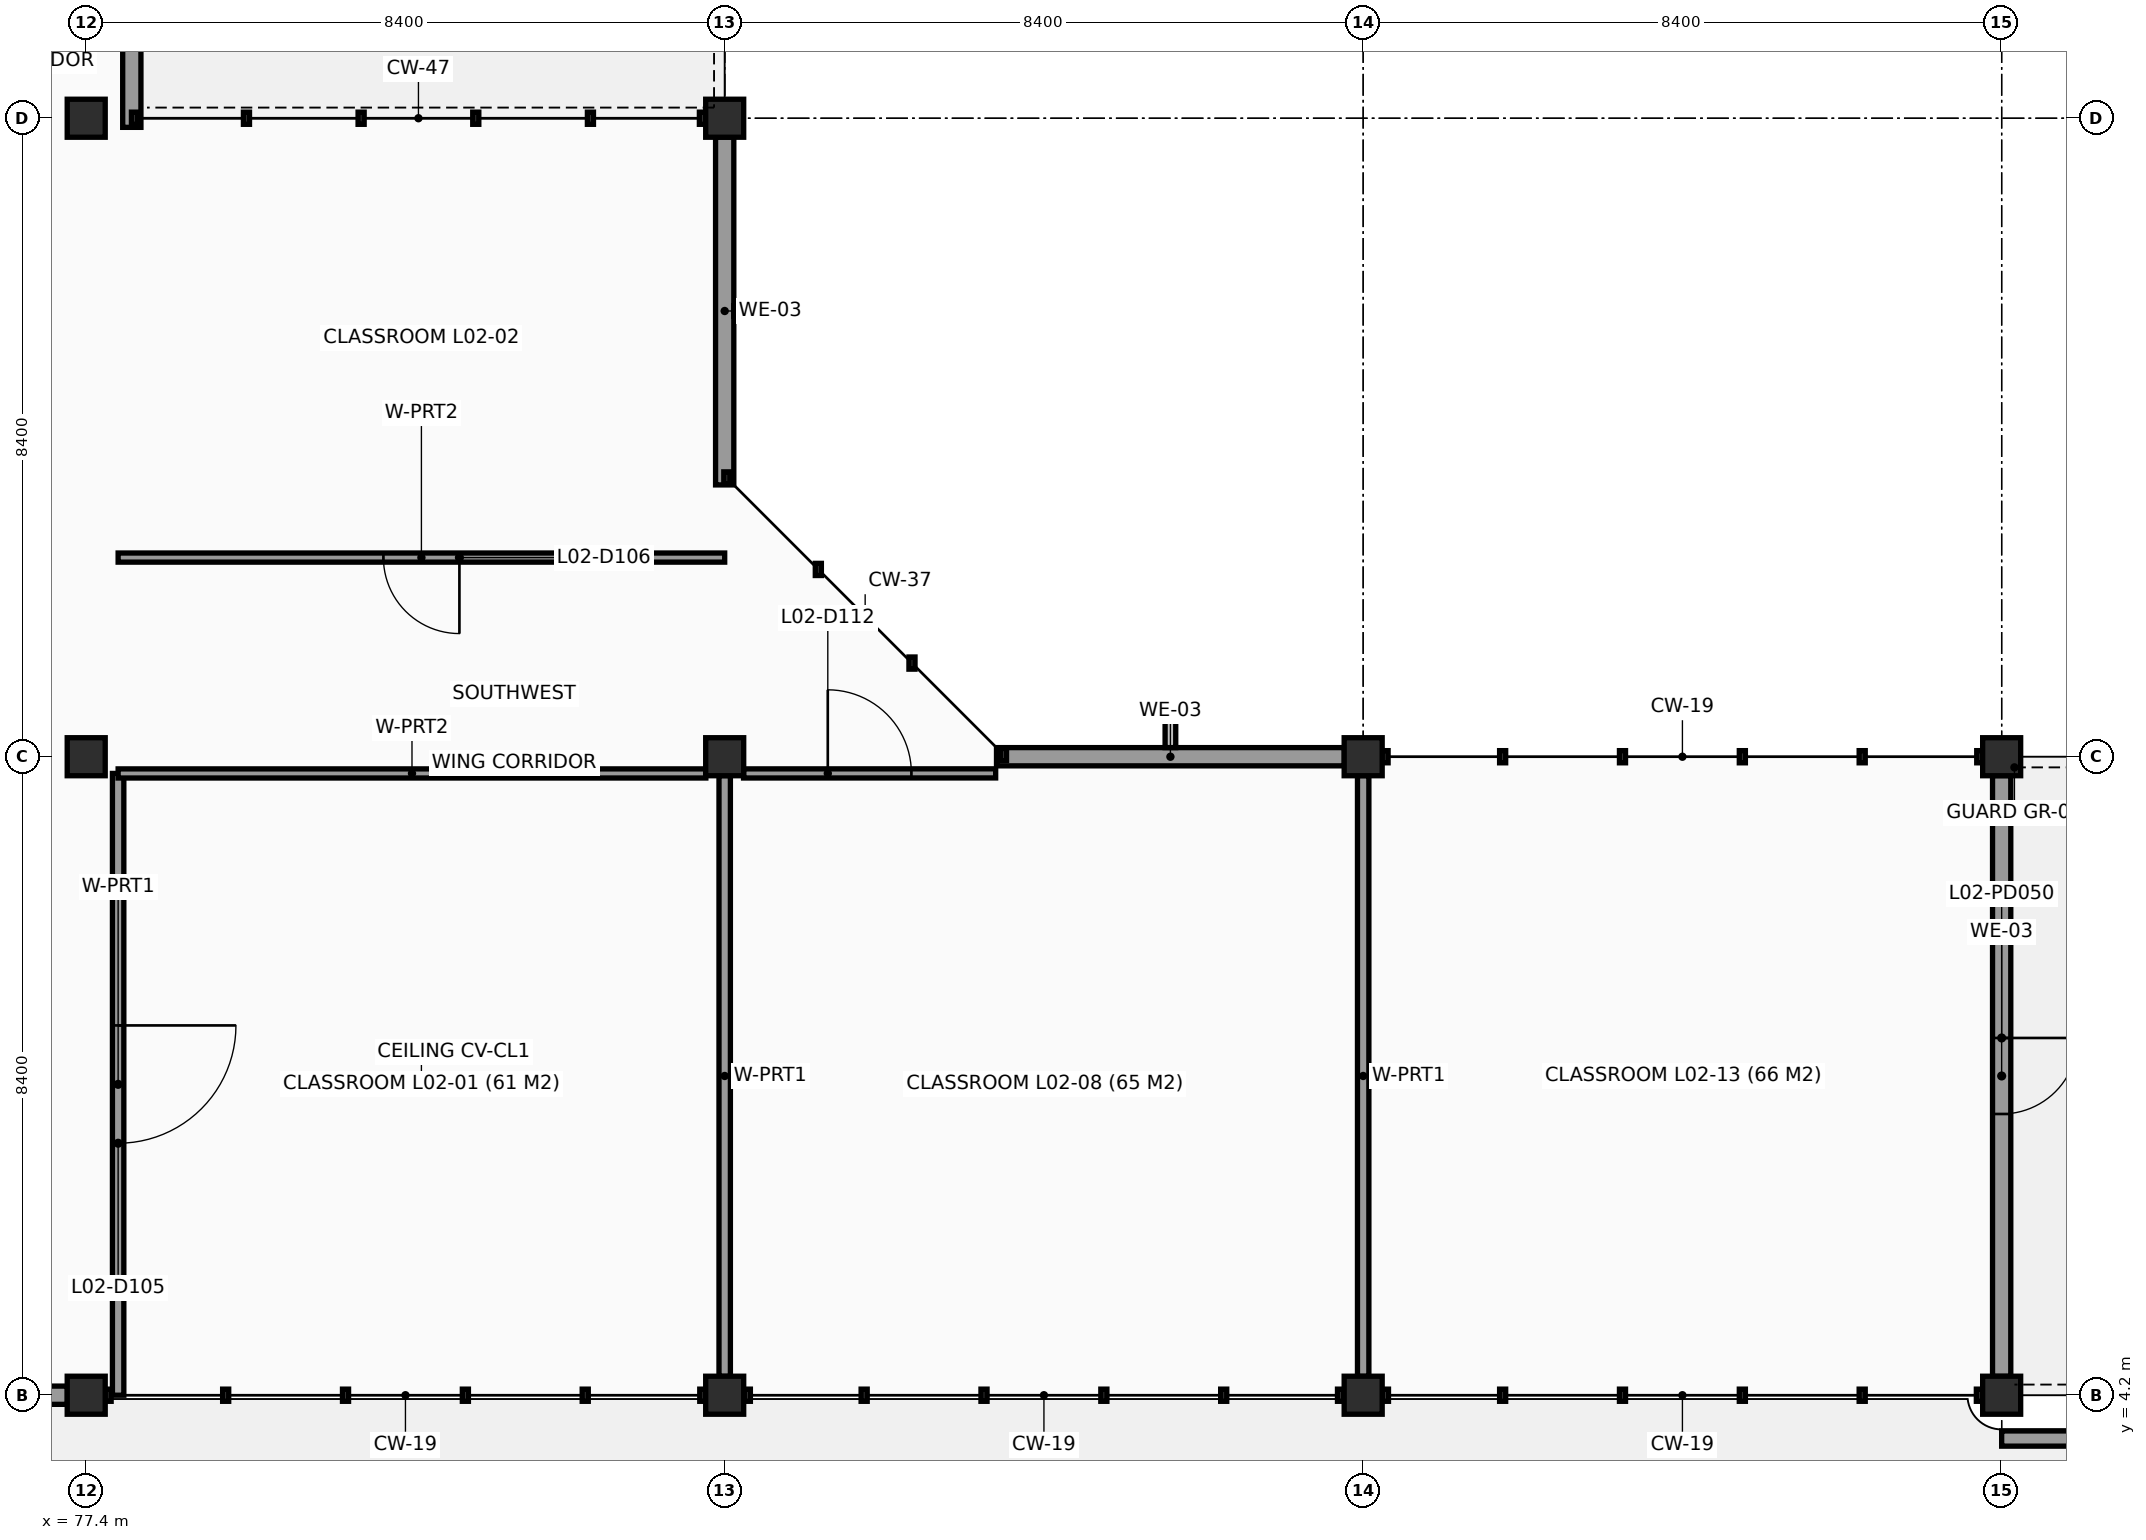
"""IFC4 building model, lengths in metres.
Left out: names, types, materials, properties, quantities, classifications, styles, units other than length and angle.
Written with IfcOpenShell. Run it as: python <this file> out.ifc"""

import sys

from ifc_helpers import new_model, si_unit, direction, frame, frame_2d, origin, origin_2d, place, context, subcontext, project, spatial, rectangle, extrude, element, fill, save


model = new_model("IFC4")
c1 = context("Model", 3, precision=1e-05, world=origin(), true_north=direction((0.0, 1.0)))
c2 = subcontext(c1, "Body", "Model", "MODEL_VIEW")
j1 = project(units=[si_unit("LENGTHUNIT", "METRE"), si_unit("PLANEANGLEUNIT", "RADIAN")], contexts=[c1])
p1 = place(None, origin())
s1 = spatial("IfcSite", under=j1, at=p1, CompositionType="ELEMENT")
p2 = place(p1, origin())
s2 = spatial("IfcBuilding", under=s1, at=p2, CompositionType="ELEMENT")
p3 = place(p2, frame((0.0, 0.0, 7.8)))
s3 = spatial("IfcBuildingStorey", under=s2, at=p3, CompositionType="ELEMENT", Elevation=7.8)
for number, where, z_axis, x_axis in (
    (1, (77.4, 4.2, 0.0), (0.0, 0.0, 1.0), (1.0, 0.0, 0.0)),
    (2, (77.4, 12.6, 0.0), (0.0, 0.0, 1.0), (1.0, 0.0, 0.0)),
    (3, (77.4, 21.0, 0.0), (0.0, 0.0, 1.0), (1.0, 0.0, 0.0)),
    (4, (85.8, 4.2, 0.0), (0.0, 0.0, 1.0), (1.0, 0.0, 0.0)),
    (5, (85.8, 12.6, 0.0), (0.0, 0.0, 1.0), (1.0, 0.0, 0.0)),
    (6, (85.8, 21.0, 0.0), (0.0, 0.0, 1.0), (1.0, 0.0, 0.0)),
    (7, (94.2, 4.2, 0.0), (0.0, 0.0, 1.0), (1.0, 0.0, 0.0)),
    (8, (94.2, 12.6, 0.0), (0.0, 0.0, 1.0), (1.0, 0.0, 0.0)),
    (9, (102.6, 4.2, 0.0), (0.0, 0.0, 1.0), (1.0, 0.0, 0.0)),
    (10, (102.6, 12.6, 0.0), (0.0, 0.0, 1.0), (1.0, 0.0, 0.0)),
):
    element("IfcColumn", number, at=place(p3, frame(where, z_axis=z_axis, x_axis=x_axis)), inside=s3, PredefinedType="COLUMN", context=c2, shape_type="SweptSolid", body=[
        extrude(rectangle(XDim=0.5, YDim=0.5, at=origin_2d()), origin(), (0.0, 0.0, 1.0), 3.34),
    ])
p4 = place(p3, frame((78.0, 29.52, 0.0), z_axis=(0.0, 0.0, 1.0), x_axis=(0.0, -1.0, 0.0)))
e11 = element("IfcWall", 11, at=p4, inside=s3, PredefinedType="SOLIDWALL", context=c2, shape_type="SweptSolid", body=[
    extrude(rectangle(XDim=8.64, YDim=0.24, at=frame_2d((4.32, 0.0))), origin(), (0.0, 0.0, 1.0), 2.58),
])
for number, where, z_axis, x_axis in (
    (12, (85.8, 20.752, 0.0), (0.0, 0.0, 1.0), (0.0, -1.0, 0.0)),
    (13, (89.376, 12.6, 0.0), (0.0, 0.0, 1.0), (1.0, 0.0, 0.0)),
):
    element("IfcWall", number, at=place(p3, frame(where, z_axis=z_axis, x_axis=x_axis)), inside=s3, PredefinedType="SOLIDWALL", context=c2, shape_type="SweptSolid", body=[
        extrude(rectangle(XDim=4.576, YDim=0.24, at=frame_2d((2.288, 0.0))), origin(), (0.0, 0.0, 1.0), 2.58),
    ])
p5 = place(p3, frame((102.6, 12.352, 0.0), z_axis=(0.0, 0.0, 1.0), x_axis=(0.0, -1.0, 0.0)))
e14 = element("IfcWall", 14, at=p5, inside=s3, PredefinedType="SOLIDWALL", context=c2, shape_type="SweptSolid", body=[
    extrude(rectangle(XDim=7.904, YDim=0.24, at=frame_2d((3.952, 0.0))), origin(), (0.0, 0.0, 1.0), 2.58),
])
p6 = place(p5, frame((3.452, 0.0, 0.0)))
e15 = element("IfcOpeningElement", 15, at=p6, cuts=e14, PredefinedType="OPENING", context=c2, shape_type="SweptSolid", body=[
    extrude(rectangle(XDim=1.0, YDim=2.15, at=frame_2d((0.5, 1.075))), frame((0.0, 0.13, 0.0), z_axis=(0.0, -1.0, 0.0), x_axis=(1.0, 0.0, 0.0)), (0.0, 0.0, 1.0), 0.26),
])
p7 = place(p3, frame((77.152, 4.2, 0.0), z_axis=(0.0, 0.0, 1.0), x_axis=(-1.0, 0.0, 0.0)))
e16 = element("IfcWall", 16, at=p7, inside=s3, PredefinedType="SOLIDWALL", context=c2, shape_type="SweptSolid", body=[
    extrude(rectangle(XDim=2.504, YDim=0.24, at=frame_2d((1.252, 0.0))), origin(), (0.0, 0.0, 1.0), 2.58),
])
p8 = place(p3, frame((102.6, 3.63, 0.0), z_axis=(0.0, 0.0, 1.0), x_axis=(1.0, 0.0, 0.0)))
e17 = element("IfcWall", 17, at=p8, inside=s3, PredefinedType="PARAPET", context=c2, shape_type="SweptSolid", body=[
    extrude(rectangle(XDim=16.68, YDim=0.2, at=frame_2d((8.34, 0.0))), origin(), (0.0, 0.0, 1.0), 1.1),
])
p9 = place(p3, frame((77.82, 4.2, 0.0), z_axis=(0.0, 0.0, 1.0), x_axis=(0.0, 1.0, 0.0)))
e18 = element("IfcWall", 18, at=p9, inside=s3, PredefinedType="PARTITIONING", context=c2, shape_type="SweptSolid", body=[
    extrude(rectangle(XDim=8.18, YDim=0.15, at=frame_2d((4.09, 0.0))), origin(), (0.0, 0.0, 1.0), 2.58),
])
p10 = place(p9, frame((3.315, 0.0, 0.0)))
e19 = element("IfcOpeningElement", 19, at=p10, cuts=e18, PredefinedType="OPENING", context=c2, shape_type="SweptSolid", body=[
    extrude(rectangle(XDim=1.55, YDim=2.2, at=frame_2d((0.775, 1.1))), frame((0.0, 0.085, 0.0), z_axis=(0.0, -1.0, 0.0), x_axis=(1.0, 0.0, 0.0)), (0.0, 0.0, 1.0), 0.17),
])
p11 = place(p3, frame((77.82, 12.38, 0.0), z_axis=(0.0, 0.0, 1.0), x_axis=(1.0, 0.0, 0.0)))
e20 = element("IfcWall", 20, at=p11, inside=s3, PredefinedType="PARTITIONING", context=c2, shape_type="SweptSolid", body=[
    extrude(rectangle(XDim=7.732, YDim=0.12, at=frame_2d((3.866, 0.0))), origin(), (0.0, 0.0, 1.0), 2.53),
])
p12 = place(p3, frame((85.8, 12.352, 0.0), z_axis=(0.0, 0.0, 1.0), x_axis=(0.0, -1.0, 0.0)))
e21 = element("IfcWall", 21, at=p12, inside=s3, PredefinedType="PARTITIONING", context=c2, shape_type="SweptSolid", body=[
    extrude(rectangle(XDim=7.904, YDim=0.15, at=frame_2d((3.952, 0.0))), origin(), (0.0, 0.0, 1.0), 2.92),
])
p13 = place(p3, frame((85.8, 15.22, 0.0), z_axis=(0.0, 0.0, 1.0), x_axis=(-1.0, 0.0, 0.0)))
e22 = element("IfcWall", 22, at=p13, inside=s3, PredefinedType="PARTITIONING", context=c2, shape_type="SweptSolid", body=[
    extrude(rectangle(XDim=7.98, YDim=0.12, at=frame_2d((3.99, 0.0))), origin(), (0.0, 0.0, 1.0), 2.58),
])
p14 = place(p13, frame((3.49, 0.0, 0.0)))
e23 = element("IfcOpeningElement", 23, at=p14, cuts=e22, PredefinedType="OPENING", context=c2, shape_type="SweptSolid", body=[
    extrude(rectangle(XDim=1.0, YDim=2.1, at=frame_2d((0.5, 1.05))), frame((0.0, 0.07, 0.0), z_axis=(0.0, -1.0, 0.0), x_axis=(1.0, 0.0, 0.0)), (0.0, 0.0, 1.0), 0.14),
])
p15 = place(p3, frame((86.048, 12.38, 0.0), z_axis=(0.0, 0.0, 1.0), x_axis=(0.99999997562, 0.00022081554, 0.0)))
e24 = element("IfcWall", 24, at=p15, inside=s3, PredefinedType="PARTITIONING", context=c2, shape_type="SweptSolid", body=[
    extrude(rectangle(XDim=3.317, YDim=0.12, at=frame_2d((1.658, 0.0))), origin(), (0.0, 0.0, 1.0), 2.58),
])
p16 = place(p15, frame((1.108, 0.0, 0.0)))
e25 = element("IfcOpeningElement", 25, at=p16, cuts=e24, PredefinedType="OPENING", context=c2, shape_type="SweptSolid", body=[
    extrude(rectangle(XDim=1.1, YDim=2.1, at=frame_2d((0.55, 1.05))), frame((0.0, 0.07, 0.0), z_axis=(0.0, -1.0, 0.0), x_axis=(1.0, 0.0, 0.0)), (0.0, 0.0, 1.0), 0.14),
])
p17 = place(p3, frame((94.2, 12.352, 0.0), z_axis=(0.0, 0.0, 1.0), x_axis=(0.0, -1.0, 0.0)))
e26 = element("IfcWall", 26, at=p17, inside=s3, PredefinedType="PARTITIONING", context=c2, shape_type="SweptSolid", body=[
    extrude(rectangle(XDim=7.904, YDim=0.15, at=frame_2d((3.952, 0.0))), origin(), (0.0, 0.0, 1.0), 2.63),
])
p18 = place(p6, origin())
e27 = element("IfcDoor", 27, at=p18, inside=s3, OperationType="SINGLE_SWING_LEFT", PredefinedType="DOOR", context=c2, shape_type="SweptSolid", body=[
    extrude(rectangle(XDim=1.0, YDim=2.15, at=frame_2d((0.5, 1.075))), frame((0.0, 0.025, 0.0), z_axis=(0.0, -1.0, 0.0), x_axis=(1.0, 0.0, 0.0)), (0.0, 0.0, 1.0), 0.05),
])
fill(e15, e27)
p19 = place(p10, origin())
e28 = element("IfcDoor", 28, at=p19, inside=s3, OperationType="DOUBLE_DOOR_SINGLE_SWING", PredefinedType="DOOR", context=c2, shape_type="SweptSolid", body=[
    extrude(rectangle(XDim=1.55, YDim=2.2, at=frame_2d((0.775, 1.1))), frame((0.0, 0.025, 0.0), z_axis=(0.0, -1.0, 0.0), x_axis=(1.0, 0.0, 0.0)), (0.0, 0.0, 1.0), 0.05),
])
fill(e19, e28)
p20 = place(p14, origin())
e29 = element("IfcDoor", 29, at=p20, inside=s3, OperationType="SINGLE_SWING_LEFT", PredefinedType="DOOR", context=c2, shape_type="SweptSolid", body=[
    extrude(rectangle(XDim=1.0, YDim=2.1, at=frame_2d((0.5, 1.05))), frame((0.0, 0.025, 0.0), z_axis=(0.0, -1.0, 0.0), x_axis=(1.0, 0.0, 0.0)), (0.0, 0.0, 1.0), 0.05),
])
fill(e23, e29)
p21 = place(p16, origin())
e30 = element("IfcDoor", 30, at=p21, inside=s3, OperationType="SINGLE_SWING_LEFT", PredefinedType="DOOR", context=c2, shape_type="SweptSolid", body=[
    extrude(rectangle(XDim=1.1, YDim=2.1, at=frame_2d((0.55, 1.05))), frame((0.0, 0.025, 0.0), z_axis=(0.0, -1.0, 0.0), x_axis=(1.0, 0.0, 0.0)), (0.0, 0.0, 1.0), 0.05),
])
fill(e25, e30)
save(model, sys.argv[1])
